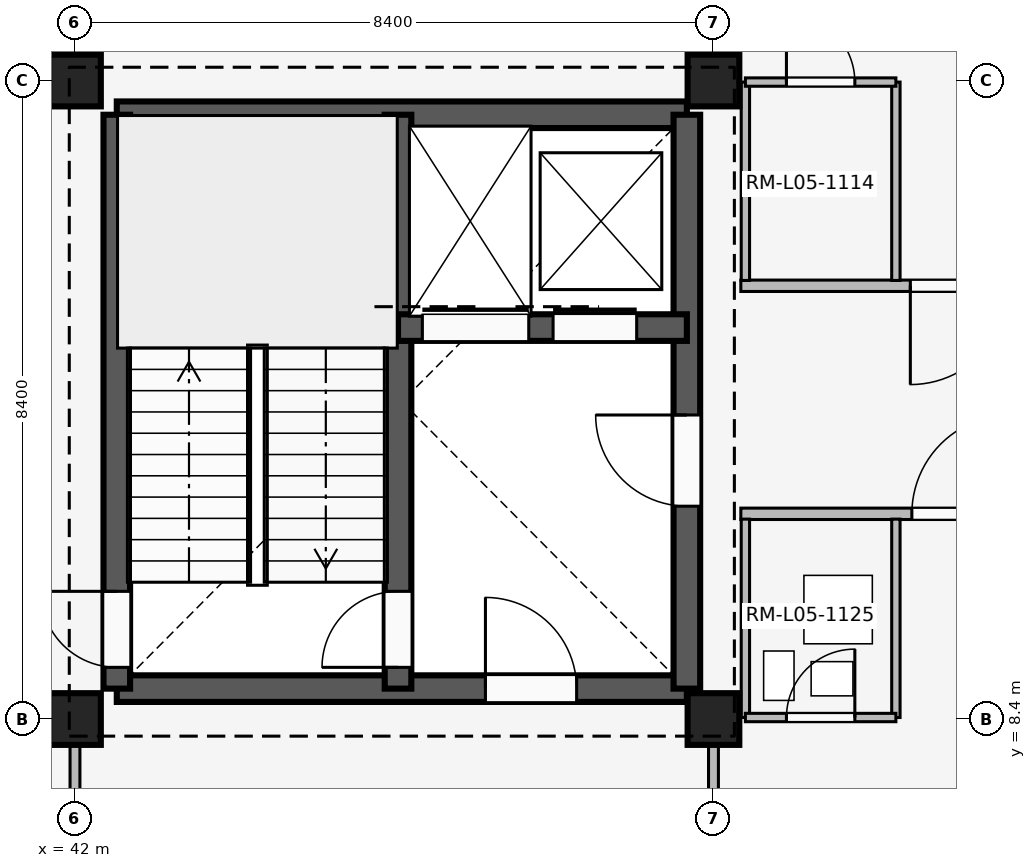
"""IFC4 building model, lengths in metres.
Left out: names, types, materials, properties, quantities, classifications, styles, units other than length and angle.
Written with IfcOpenShell. Run it as: python <this file> out.ifc"""

import sys

from ifc_helpers import new_model, si_unit, direction, frame, frame_2d, origin, origin_2d, place, context, subcontext, project, spatial, rectangle, extrude, element, fill, save


model = new_model("IFC4")
c1 = context("Model", 3, precision=1e-05, world=origin(), true_north=direction((0.0, 1.0)))
c2 = subcontext(c1, "Body", "Model", "MODEL_VIEW")
j1 = project(units=[si_unit("LENGTHUNIT", "METRE"), si_unit("PLANEANGLEUNIT", "RADIAN")], contexts=[c1])
p1 = place(None, origin())
s1 = spatial("IfcSite", under=j1, at=p1, CompositionType="ELEMENT")
p2 = place(p1, origin())
s2 = spatial("IfcBuilding", under=s1, at=p2, CompositionType="ELEMENT")
p3 = place(p2, frame((0.0, 0.0, 20.4)))
s3 = spatial("IfcBuildingStorey", under=s2, at=p3, CompositionType="ELEMENT", Elevation=20.4)
for number, where, z_axis, x_axis in (
    (1, (42.0, 8.4, 0.0), (0.0, 0.0, 1.0), (1.0, 0.0, 0.0)),
    (2, (42.0, 16.8, 0.0), (0.0, 0.0, 1.0), (1.0, 0.0, 0.0)),
    (3, (50.4, 8.4, 0.0), (0.0, 0.0, 1.0), (1.0, 0.0, 0.0)),
    (4, (50.4, 16.8, 0.0), (0.0, 0.0, 1.0), (1.0, 0.0, 0.0)),
):
    element("IfcColumn", number, at=place(p3, frame(where, z_axis=z_axis, x_axis=x_axis)), inside=s3, PredefinedType="COLUMN", context=c2, shape_type="SweptSolid", body=[
        extrude(rectangle(XDim=0.68, YDim=0.68, at=origin_2d()), origin(), (0.0, 0.0, 1.0), 4.2),
    ])
p4 = place(p3, frame((42.55, 8.8, 0.0), z_axis=(0.0, 0.0, 1.0), x_axis=(1.0, 0.0, 0.0)))
e5 = element("IfcWall", 5, at=p4, inside=s3, PredefinedType="SHEAR", context=c2, shape_type="SweptSolid", body=[
    extrude(rectangle(XDim=7.5, YDim=0.35, at=frame_2d((3.75, 0.0))), origin(), (0.0, 0.0, 1.0), 3.92),
])
p5 = place(p4, frame((4.85, 0.0, 0.0)))
e6 = element("IfcOpeningElement", 6, at=p5, cuts=e5, PredefinedType="OPENING", context=c2, shape_type="SweptSolid", body=[
    extrude(rectangle(XDim=1.2, YDim=2.2, at=frame_2d((0.6, 1.1))), frame((0.0, 0.185, 0.0), z_axis=(0.0, -1.0, 0.0), x_axis=(1.0, 0.0, 0.0)), (0.0, 0.0, 1.0), 0.37),
])
p6 = place(p3, frame((42.55, 16.35, 0.0), z_axis=(0.0, 0.0, 1.0), x_axis=(1.0, 0.0, 0.0)))
e7 = element("IfcWall", 7, at=p6, inside=s3, PredefinedType="SHEAR", context=c2, shape_type="SweptSolid", body=[
    extrude(rectangle(XDim=7.5, YDim=0.35, at=frame_2d((3.75, 0.0))), origin(), (0.0, 0.0, 1.0), 3.92),
])
p7 = place(p3, frame((42.55, 8.8, 0.0), z_axis=(0.0, 0.0, 1.0), x_axis=(0.0, 1.0, 0.0)))
e8 = element("IfcWall", 8, at=p7, inside=s3, PredefinedType="SHEAR", context=c2, shape_type="SweptSolid", body=[
    extrude(rectangle(XDim=7.55, YDim=0.35, at=frame_2d((3.775, 0.0))), origin(), (0.0, 0.0, 1.0), 3.92),
])
p8 = place(p7, frame((0.28, 0.0, 0.0)))
e9 = element("IfcOpeningElement", 9, at=p8, cuts=e8, PredefinedType="OPENING", context=c2, shape_type="SweptSolid", body=[
    extrude(rectangle(XDim=1.0, YDim=2.15, at=frame_2d((0.5, 1.075))), frame((0.0, 0.185, 0.0), z_axis=(0.0, -1.0, 0.0), x_axis=(1.0, 0.0, 0.0)), (0.0, 0.0, 1.0), 0.37),
])
p9 = place(p3, frame((50.05, 8.8, 0.0), z_axis=(0.0, 0.0, 1.0), x_axis=(0.0, 1.0, 0.0)))
e10 = element("IfcWall", 10, at=p9, inside=s3, PredefinedType="SHEAR", context=c2, shape_type="SweptSolid", body=[
    extrude(rectangle(XDim=7.55, YDim=0.35, at=frame_2d((3.775, 0.0))), origin(), (0.0, 0.0, 1.0), 3.92),
])
p10 = place(p9, frame((2.4, 0.0, 0.0)))
e11 = element("IfcOpeningElement", 11, at=p10, cuts=e10, PredefinedType="OPENING", context=c2, shape_type="SweptSolid", body=[
    extrude(rectangle(XDim=1.2, YDim=2.2, at=frame_2d((0.6, 1.1))), frame((0.0, 0.185, 0.0), z_axis=(0.0, -1.0, 0.0), x_axis=(1.0, 0.0, 0.0)), (0.0, 0.0, 1.0), 0.37),
])
p11 = place(p3, frame((46.25, 8.8, 0.0), z_axis=(0.0, 0.0, 1.0), x_axis=(0.0, 1.0, 0.0)))
e12 = element("IfcWall", 12, at=p11, inside=s3, PredefinedType="SHEAR", context=c2, shape_type="SweptSolid", body=[
    extrude(rectangle(XDim=7.55, YDim=0.35, at=frame_2d((3.775, 0.0))), origin(), (0.0, 0.0, 1.0), 3.92),
])
p12 = place(p11, frame((0.28, 0.0, 0.0)))
e13 = element("IfcOpeningElement", 13, at=p12, cuts=e12, PredefinedType="OPENING", context=c2, shape_type="SweptSolid", body=[
    extrude(rectangle(XDim=1.0, YDim=2.15, at=frame_2d((0.5, 1.075))), frame((0.0, 0.185, 0.0), z_axis=(0.0, -1.0, 0.0), x_axis=(1.0, 0.0, 0.0)), (0.0, 0.0, 1.0), 0.37),
])
p13 = place(p3, frame((46.25, 13.55, 0.0), z_axis=(0.0, 0.0, 1.0), x_axis=(1.0, 0.0, 0.0)))
e14 = element("IfcWall", 14, at=p13, inside=s3, PredefinedType="SHEAR", context=c2, shape_type="SweptSolid", body=[
    extrude(rectangle(XDim=3.8, YDim=0.35, at=frame_2d((1.9, 0.0))), origin(), (0.0, 0.0, 1.0), 3.92),
])
p14 = place(p13, frame((0.32, 0.0, 0.0)))
e15 = element("IfcOpeningElement", 15, at=p14, cuts=e14, PredefinedType="OPENING", context=c2, shape_type="SweptSolid", body=[
    extrude(rectangle(XDim=1.4, YDim=2.25, at=frame_2d((0.7, 1.125))), frame((0.0, 0.185, 0.0), z_axis=(0.0, -1.0, 0.0), x_axis=(1.0, 0.0, 0.0)), (0.0, 0.0, 1.0), 0.37),
])
p15 = place(p13, frame((2.04, 0.0, 0.0)))
e16 = element("IfcOpeningElement", 16, at=p15, cuts=e14, PredefinedType="OPENING", context=c2, shape_type="SweptSolid", body=[
    extrude(rectangle(XDim=1.1, YDim=2.15, at=frame_2d((0.55, 1.075))), frame((0.0, 0.185, 0.0), z_axis=(0.0, -1.0, 0.0), x_axis=(1.0, 0.0, 0.0)), (0.0, 0.0, 1.0), 0.37),
])
p16 = place(p3, frame((42.0, 0.14, 0.0), z_axis=(0.0, 0.0, 1.0), x_axis=(0.0, 1.0, 0.0)))
e17 = element("IfcWall", 17, at=p16, inside=s3, PredefinedType="PARTITIONING", context=c2, shape_type="SweptSolid", body=[
    extrude(rectangle(XDim=8.21, YDim=0.13, at=frame_2d((4.105, 0.0))), origin(), (0.0, 0.0, 1.0), 3.32),
])
p17 = place(p16, frame((3.64, 0.0, 0.0)))
e18 = element("IfcOpeningElement", 18, at=p17, cuts=e17, PredefinedType="OPENING", context=c2, shape_type="SweptSolid", body=[
    extrude(rectangle(XDim=1.08, YDim=2.15, at=frame_2d((0.54, 1.075))), frame((0.0, 0.075, 0.0), z_axis=(0.0, -1.0, 0.0), x_axis=(1.0, 0.0, 0.0)), (0.0, 0.0, 1.0), 0.15),
])
p18 = place(p3, frame((42.0, 17.15, 0.0), z_axis=(0.0, 0.0, 1.0), x_axis=(0.0, 1.0, 0.0)))
e19 = element("IfcWall", 19, at=p18, inside=s3, PredefinedType="PARTITIONING", context=c2, shape_type="SweptSolid", body=[
    extrude(rectangle(XDim=7.91, YDim=0.13, at=frame_2d((3.955, 0.0))), origin(), (0.0, 0.0, 1.0), 3.32),
])
p19 = place(p18, frame((3.4, 0.0, 0.0)))
e20 = element("IfcOpeningElement", 20, at=p19, cuts=e19, PredefinedType="OPENING", context=c2, shape_type="SweptSolid", body=[
    extrude(rectangle(XDim=1.05, YDim=2.2, at=frame_2d((0.525, 1.1))), frame((0.0, 0.075, 0.0), z_axis=(0.0, -1.0, 0.0), x_axis=(1.0, 0.0, 0.0)), (0.0, 0.0, 1.0), 0.15),
])
p20 = place(p3, frame((50.4, 0.14, 0.0), z_axis=(0.0, 0.0, 1.0), x_axis=(0.0, 1.0, 0.0)))
e21 = element("IfcWall", 21, at=p20, inside=s3, PredefinedType="PARTITIONING", context=c2, shape_type="SweptSolid", body=[
    extrude(rectangle(XDim=8.21, YDim=0.13, at=frame_2d((4.105, 0.0))), origin(), (0.0, 0.0, 1.0), 3.32),
])
p21 = place(p20, frame((3.64, 0.0, 0.0)))
e22 = element("IfcOpeningElement", 22, at=p21, cuts=e21, PredefinedType="OPENING", context=c2, shape_type="SweptSolid", body=[
    extrude(rectangle(XDim=1.08, YDim=2.15, at=frame_2d((0.54, 1.075))), frame((0.0, 0.075, 0.0), z_axis=(0.0, -1.0, 0.0), x_axis=(1.0, 0.0, 0.0)), (0.0, 0.0, 1.0), 0.15),
])
p22 = place(p3, frame((50.4, 17.15, 0.0), z_axis=(0.0, 0.0, 1.0), x_axis=(0.0, 1.0, 0.0)))
e23 = element("IfcWall", 23, at=p22, inside=s3, PredefinedType="PARTITIONING", context=c2, shape_type="SweptSolid", body=[
    extrude(rectangle(XDim=7.91, YDim=0.13, at=frame_2d((3.955, 0.0))), origin(), (0.0, 0.0, 1.0), 3.32),
])
p23 = place(p22, frame((3.4, 0.0, 0.0)))
e24 = element("IfcOpeningElement", 24, at=p23, cuts=e23, PredefinedType="OPENING", context=c2, shape_type="SweptSolid", body=[
    extrude(rectangle(XDim=1.05, YDim=2.2, at=frame_2d((0.525, 1.1))), frame((0.0, 0.075, 0.0), z_axis=(0.0, -1.0, 0.0), x_axis=(1.0, 0.0, 0.0)), (0.0, 0.0, 1.0), 0.15),
])
p24 = place(p3, frame((50.76, 11.1, 0.0), z_axis=(0.0, 0.0, 1.0), x_axis=(1.0, 0.0, 0.0)))
e25 = element("IfcWall", 25, at=p24, inside=s3, PredefinedType="PARTITIONING", context=c2, shape_type="SweptSolid", body=[
    extrude(rectangle(XDim=7.96, YDim=0.15, at=frame_2d((3.98, 0.0))), origin(), (0.0, 0.0, 1.0), 3.32),
])
p25 = place(p24, frame((2.25, 0.0, 0.0)))
e26 = element("IfcOpeningElement", 26, at=p25, cuts=e25, PredefinedType="OPENING", context=c2, shape_type="SweptSolid", body=[
    extrude(rectangle(XDim=1.3, YDim=2.25, at=frame_2d((0.65, 1.125))), frame((0.0, 0.085, 0.0), z_axis=(0.0, -1.0, 0.0), x_axis=(1.0, 0.0, 0.0)), (0.0, 0.0, 1.0), 0.17),
])
p26 = place(p24, frame((5.95, 0.0, 0.0)))
e27 = element("IfcOpeningElement", 27, at=p26, cuts=e25, PredefinedType="OPENING", context=c2, shape_type="SweptSolid", body=[
    extrude(rectangle(XDim=1.3, YDim=2.25, at=frame_2d((0.65, 1.125))), frame((0.0, 0.085, 0.0), z_axis=(0.0, -1.0, 0.0), x_axis=(1.0, 0.0, 0.0)), (0.0, 0.0, 1.0), 0.17),
])
for number, where, z_axis, x_axis in (
    (28, (50.82, 8.42, 0.0), (0.0, 0.0, 1.0), (0.0, 1.0, 0.0)),
    (29, (52.8, 8.42, 0.0), (0.0, 0.0, 1.0), (0.0, 1.0, 0.0)),
):
    element("IfcWall", number, at=place(p3, frame(where, z_axis=z_axis, x_axis=x_axis)), inside=s3, PredefinedType="PARTITIONING", context=c2, shape_type="SweptSolid", body=[
        extrude(rectangle(XDim=2.61, YDim=0.11, at=frame_2d((1.305, 0.0))), origin(), (0.0, 0.0, 1.0), 3.32),
    ])
p27 = place(p3, frame((50.82, 8.42, 0.0), z_axis=(0.0, 0.0, 1.0), x_axis=(1.0, 0.0, 0.0)))
e30 = element("IfcWall", 30, at=p27, inside=s3, PredefinedType="PARTITIONING", context=c2, shape_type="SweptSolid", body=[
    extrude(rectangle(XDim=1.98, YDim=0.11, at=frame_2d((0.99, 0.0))), origin(), (0.0, 0.0, 1.0), 3.32),
])
p28 = place(p27, frame((0.54, 0.0, 0.0)))
e31 = element("IfcOpeningElement", 31, at=p28, cuts=e30, PredefinedType="OPENING", context=c2, shape_type="SweptSolid", body=[
    extrude(rectangle(XDim=0.9, YDim=2.1, at=frame_2d((0.45, 1.05))), frame((0.0, 0.065, 0.0), z_axis=(0.0, -1.0, 0.0), x_axis=(1.0, 0.0, 0.0)), (0.0, 0.0, 1.0), 0.13),
])
p29 = place(p3, frame((58.72, 14.1, 0.0), z_axis=(0.0, 0.0, 1.0), x_axis=(-1.0, 0.0, 0.0)))
e32 = element("IfcWall", 32, at=p29, inside=s3, PredefinedType="PARTITIONING", context=c2, shape_type="SweptSolid", body=[
    extrude(rectangle(XDim=7.96, YDim=0.15, at=frame_2d((3.98, 0.0))), origin(), (0.0, 0.0, 1.0), 3.32),
])
p30 = place(p29, frame((0.73, 0.0, 0.0)))
e33 = element("IfcOpeningElement", 33, at=p30, cuts=e32, PredefinedType="OPENING", context=c2, shape_type="SweptSolid", body=[
    extrude(rectangle(XDim=1.3, YDim=2.25, at=frame_2d((0.65, 1.125))), frame((0.0, 0.085, 0.0), z_axis=(0.0, -1.0, 0.0), x_axis=(1.0, 0.0, 0.0)), (0.0, 0.0, 1.0), 0.17),
])
p31 = place(p29, frame((4.43, 0.0, 0.0)))
e34 = element("IfcOpeningElement", 34, at=p31, cuts=e32, PredefinedType="OPENING", context=c2, shape_type="SweptSolid", body=[
    extrude(rectangle(XDim=1.3, YDim=2.25, at=frame_2d((0.65, 1.125))), frame((0.0, 0.085, 0.0), z_axis=(0.0, -1.0, 0.0), x_axis=(1.0, 0.0, 0.0)), (0.0, 0.0, 1.0), 0.17),
])
for number, where, z_axis, x_axis in (
    (35, (50.82, 14.17, 0.0), (0.0, 0.0, 1.0), (0.0, 1.0, 0.0)),
    (36, (52.8, 14.17, 0.0), (0.0, 0.0, 1.0), (0.0, 1.0, 0.0)),
):
    element("IfcWall", number, at=place(p3, frame(where, z_axis=z_axis, x_axis=x_axis)), inside=s3, PredefinedType="PARTITIONING", context=c2, shape_type="SweptSolid", body=[
        extrude(rectangle(XDim=2.61, YDim=0.11, at=frame_2d((1.305, 0.0))), origin(), (0.0, 0.0, 1.0), 3.32),
    ])
p32 = place(p3, frame((50.82, 16.78, 0.0), z_axis=(0.0, 0.0, 1.0), x_axis=(1.0, 0.0, 0.0)))
e37 = element("IfcWall", 37, at=p32, inside=s3, PredefinedType="PARTITIONING", context=c2, shape_type="SweptSolid", body=[
    extrude(rectangle(XDim=1.98, YDim=0.11, at=frame_2d((0.99, 0.0))), origin(), (0.0, 0.0, 1.0), 3.32),
])
p33 = place(p32, frame((0.54, 0.0, 0.0)))
e38 = element("IfcOpeningElement", 38, at=p33, cuts=e37, PredefinedType="OPENING", context=c2, shape_type="SweptSolid", body=[
    extrude(rectangle(XDim=0.9, YDim=2.1, at=frame_2d((0.45, 1.05))), frame((0.0, 0.065, 0.0), z_axis=(0.0, -1.0, 0.0), x_axis=(1.0, 0.0, 0.0)), (0.0, 0.0, 1.0), 0.13),
])
p34 = place(p10, origin())
e39 = element("IfcDoor", 39, at=p34, inside=s3, OperationType="SINGLE_SWING_RIGHT", PredefinedType="DOOR", context=c2, shape_type="SweptSolid", body=[
    extrude(rectangle(XDim=1.2, YDim=2.2, at=frame_2d((0.6, 1.1))), frame((0.0, 0.025, 0.0), z_axis=(0.0, -1.0, 0.0), x_axis=(1.0, 0.0, 0.0)), (0.0, 0.0, 1.0), 0.05),
])
fill(e11, e39)
p35 = place(p5, origin())
e40 = element("IfcDoor", 40, at=p35, inside=s3, OperationType="SINGLE_SWING_LEFT", PredefinedType="DOOR", context=c2, shape_type="SweptSolid", body=[
    extrude(rectangle(XDim=1.2, YDim=2.2, at=frame_2d((0.6, 1.1))), frame((0.0, 0.025, 0.0), z_axis=(0.0, -1.0, 0.0), x_axis=(1.0, 0.0, 0.0)), (0.0, 0.0, 1.0), 0.05),
])
fill(e6, e40)
p36 = place(p8, origin())
e41 = element("IfcDoor", 41, at=p36, inside=s3, OperationType="SINGLE_SWING_RIGHT", PredefinedType="DOOR", context=c2, shape_type="SweptSolid", body=[
    extrude(rectangle(XDim=1.0, YDim=2.15, at=frame_2d((0.5, 1.075))), frame((0.0, 0.025, 0.0), z_axis=(0.0, -1.0, 0.0), x_axis=(1.0, 0.0, 0.0)), (0.0, 0.0, 1.0), 0.05),
])
fill(e9, e41)
p37 = place(p12, origin())
e42 = element("IfcDoor", 42, at=p37, inside=s3, OperationType="SINGLE_SWING_LEFT", PredefinedType="DOOR", context=c2, shape_type="SweptSolid", body=[
    extrude(rectangle(XDim=1.0, YDim=2.15, at=frame_2d((0.5, 1.075))), frame((0.0, 0.025, 0.0), z_axis=(0.0, -1.0, 0.0), x_axis=(1.0, 0.0, 0.0)), (0.0, 0.0, 1.0), 0.05),
])
fill(e13, e42)
p38 = place(p14, origin())
e43 = element("IfcDoor", 43, at=p38, inside=s3, OperationType="SLIDING_TO_LEFT", PredefinedType="DOOR", context=c2, shape_type="SweptSolid", body=[
    extrude(rectangle(XDim=1.4, YDim=2.25, at=frame_2d((0.7, 1.125))), frame((0.0, 0.025, 0.0), z_axis=(0.0, -1.0, 0.0), x_axis=(1.0, 0.0, 0.0)), (0.0, 0.0, 1.0), 0.05),
])
fill(e15, e43)
p39 = place(p15, origin())
e44 = element("IfcDoor", 44, at=p39, inside=s3, OperationType="SLIDING_TO_LEFT", PredefinedType="DOOR", context=c2, shape_type="SweptSolid", body=[
    extrude(rectangle(XDim=1.1, YDim=2.15, at=frame_2d((0.55, 1.075))), frame((0.0, 0.025, 0.0), z_axis=(0.0, -1.0, 0.0), x_axis=(1.0, 0.0, 0.0)), (0.0, 0.0, 1.0), 0.05),
])
fill(e16, e44)
p40 = place(p25, origin())
e45 = element("IfcDoor", 45, at=p40, inside=s3, OperationType="SINGLE_SWING_RIGHT", PredefinedType="DOOR", context=c2, shape_type="SweptSolid", body=[
    extrude(rectangle(XDim=1.3, YDim=2.25, at=frame_2d((0.65, 1.125))), frame((0.0, 0.025, 0.0), z_axis=(0.0, -1.0, 0.0), x_axis=(1.0, 0.0, 0.0)), (0.0, 0.0, 1.0), 0.05),
])
fill(e26, e45)
p41 = place(p28, origin())
e46 = element("IfcDoor", 46, at=p41, inside=s3, OperationType="SINGLE_SWING_RIGHT", PredefinedType="DOOR", context=c2, shape_type="SweptSolid", body=[
    extrude(rectangle(XDim=0.9, YDim=2.1, at=frame_2d((0.45, 1.05))), frame((0.0, 0.025, 0.0), z_axis=(0.0, -1.0, 0.0), x_axis=(1.0, 0.0, 0.0)), (0.0, 0.0, 1.0), 0.05),
])
fill(e31, e46)
p42 = place(p31, origin())
e47 = element("IfcDoor", 47, at=p42, inside=s3, OperationType="SINGLE_SWING_RIGHT", PredefinedType="DOOR", context=c2, shape_type="SweptSolid", body=[
    extrude(rectangle(XDim=1.3, YDim=2.25, at=frame_2d((0.65, 1.125))), frame((0.0, 0.025, 0.0), z_axis=(0.0, -1.0, 0.0), x_axis=(1.0, 0.0, 0.0)), (0.0, 0.0, 1.0), 0.05),
])
fill(e34, e47)
p43 = place(p33, origin())
e48 = element("IfcDoor", 48, at=p43, inside=s3, OperationType="SINGLE_SWING_LEFT", PredefinedType="DOOR", context=c2, shape_type="SweptSolid", body=[
    extrude(rectangle(XDim=0.9, YDim=2.1, at=frame_2d((0.45, 1.05))), frame((0.0, 0.025, 0.0), z_axis=(0.0, -1.0, 0.0), x_axis=(1.0, 0.0, 0.0)), (0.0, 0.0, 1.0), 0.05),
])
fill(e38, e48)
save(model, sys.argv[1])
